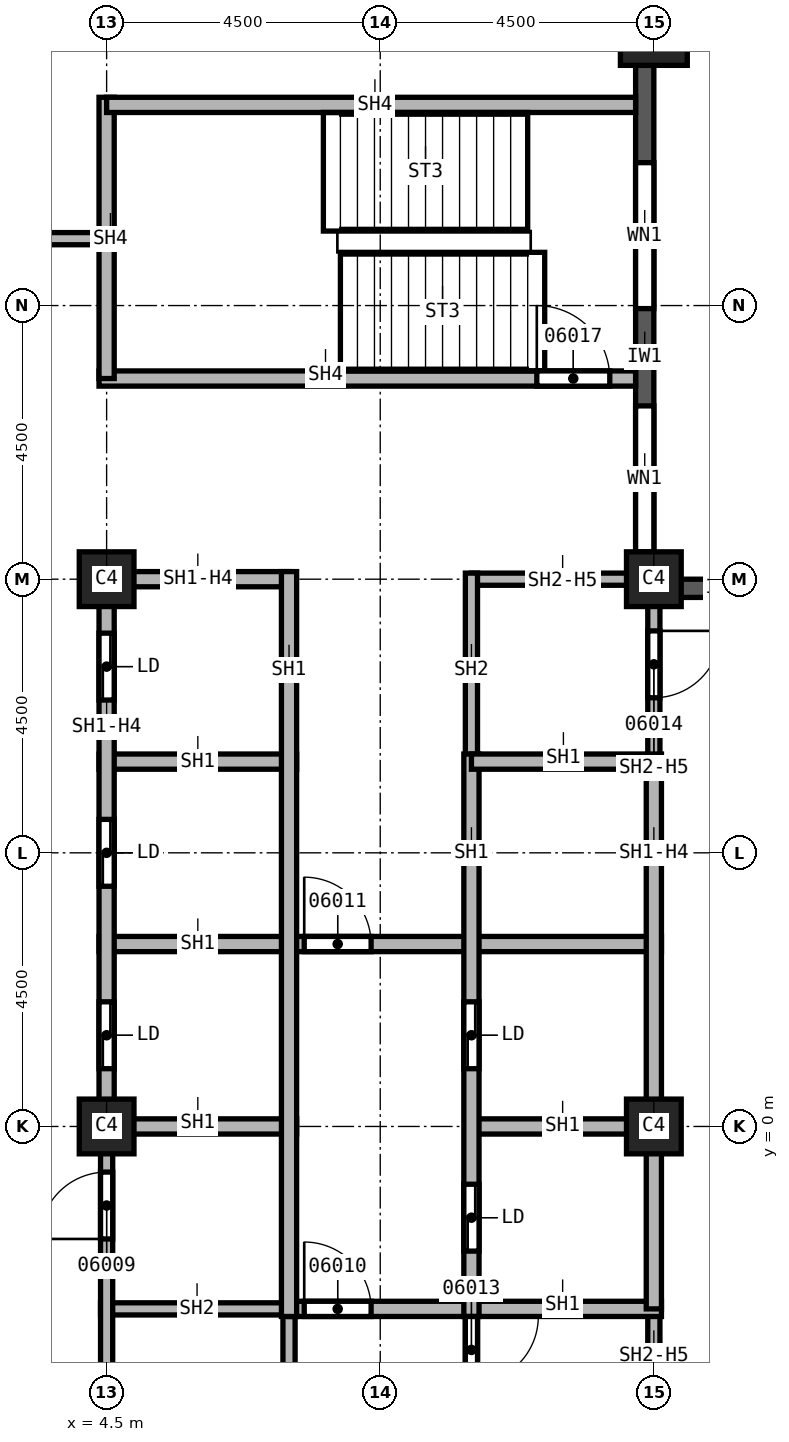
"""IFC4 building model, lengths in metres.
Left out: names, types, materials, properties, quantities, classifications, styles, units other than length and angle.
Written with IfcOpenShell. Run it as: python <this file> out.ifc"""

import sys

from ifc_helpers import new_model, si_unit, direction, frame, frame_2d, origin, origin_2d, place, context, subcontext, project, spatial, rectangle, extrude, element, fill, save


model = new_model("IFC4")
c1 = context("Model", 3, precision=1e-05, world=origin(), true_north=direction((0.0, 1.0)))
c2 = subcontext(c1, "Body", "Model", "MODEL_VIEW")
j1 = project(units=[si_unit("LENGTHUNIT", "METRE"), si_unit("PLANEANGLEUNIT", "RADIAN")], contexts=[c1])
p1 = place(None, origin())
s1 = spatial("IfcSite", under=j1, at=p1, CompositionType="ELEMENT")
p2 = place(p1, origin())
s2 = spatial("IfcBuilding", under=s1, at=p2, CompositionType="ELEMENT")
p3 = place(p2, frame((0.0, 0.0, 126.0)))
s3 = spatial("IfcBuildingStorey", under=s2, at=p3, CompositionType="ELEMENT", Elevation=126.0)
p4 = place(p3, frame((13.5, 18.0, 0.0), z_axis=(0.0, 0.0, 1.0), x_axis=(1.0, 0.0, 0.0)))
e1 = element("IfcColumn", 1, at=p4, inside=s3, PredefinedType="COLUMN", context=c2, shape_type="SweptSolid", body=[
    extrude(rectangle(XDim=1.1, YDim=1.1, at=origin_2d()), origin(), (0.0, 0.0, 1.0), 3.7),
])
for number, where, z_axis, x_axis in (
    (2, (4.5, 0.0, 0.0), (0.0, 0.0, 1.0), (1.0, 0.0, 0.0)),
    (3, (4.5, 9.0, 0.0), (0.0, 0.0, 1.0), (1.0, 0.0, 0.0)),
    (4, (13.5, 0.0, 0.0), (0.0, 0.0, 1.0), (1.0, 0.0, 0.0)),
    (5, (13.5, 9.0, 0.0), (0.0, 0.0, 1.0), (1.0, 0.0, 0.0)),
):
    element("IfcColumn", number, at=place(p3, frame(where, z_axis=z_axis, x_axis=x_axis)), inside=s3, PredefinedType="COLUMN", context=c2, shape_type="SweptSolid", body=[
        extrude(rectangle(XDim=0.9, YDim=0.9, at=origin_2d()), origin(), (0.0, 0.0, 1.0), 3.7),
    ])
p5 = place(p3, frame((13.35, 9.05, 0.0), z_axis=(0.0, 0.0, 1.0), x_axis=(0.0, 1.0, 0.0)))
e6 = element("IfcWall", 6, at=p5, inside=s3, PredefinedType="SOLIDWALL", context=c2, shape_type="SweptSolid", body=[
    extrude(rectangle(XDim=8.4, YDim=0.3, at=frame_2d((4.2, 0.0))), origin(), (0.0, 0.0, 1.0), 3.1),
])
p6 = place(p5, frame((0.4, 0.0, 0.8)))
e7 = element("IfcOpeningElement", 7, at=p6, cuts=e6, PredefinedType="OPENING", context=c2, shape_type="SweptSolid", body=[
    extrude(rectangle(XDim=2.4, YDim=1.95, at=frame_2d((1.2, 0.975))), frame((0.0, 0.15, 0.0), z_axis=(0.0, -1.0, 0.0), x_axis=(1.0, 0.0, 0.0)), (0.0, 0.0, 1.0), 0.3),
])
p7 = place(p5, frame((4.4, 0.0, 0.8)))
e8 = element("IfcOpeningElement", 8, at=p7, cuts=e6, PredefinedType="OPENING", context=c2, shape_type="SweptSolid", body=[
    extrude(rectangle(XDim=2.4, YDim=1.95, at=frame_2d((1.2, 0.975))), frame((0.0, 0.15, 0.0), z_axis=(0.0, -1.0, 0.0), x_axis=(1.0, 0.0, 0.0)), (0.0, 0.0, 1.0), 0.3),
])
p8 = place(p3, frame((21.95, 8.85, 0.0), z_axis=(0.0, 0.0, 1.0), x_axis=(-1.0, 0.0, 0.0)))
e9 = element("IfcWall", 9, at=p8, inside=s3, PredefinedType="SOLIDWALL", context=c2, shape_type="SweptSolid", body=[
    extrude(rectangle(XDim=8.4, YDim=0.3, at=frame_2d((4.2, 0.0))), origin(), (0.0, 0.0, 1.0), 3.1),
])
p9 = place(p8, frame((1.65, 0.0, 0.8)))
e10 = element("IfcOpeningElement", 10, at=p9, cuts=e9, PredefinedType="OPENING", context=c2, shape_type="SweptSolid", body=[
    extrude(rectangle(XDim=1.4, YDim=1.95, at=frame_2d((0.7, 0.975))), frame((0.0, 0.15, 0.0), z_axis=(0.0, -1.0, 0.0), x_axis=(1.0, 0.0, 0.0)), (0.0, 0.0, 1.0), 0.3),
])
p10 = place(p8, frame((4.875, 0.0, 0.8)))
e11 = element("IfcOpeningElement", 11, at=p10, cuts=e9, PredefinedType="OPENING", context=c2, shape_type="SweptSolid", body=[
    extrude(rectangle(XDim=1.4, YDim=1.95, at=frame_2d((0.7, 0.975))), frame((0.0, 0.15, 0.0), z_axis=(0.0, -1.0, 0.0), x_axis=(1.0, 0.0, 0.0)), (0.0, 0.0, 1.0), 0.3),
])
p11 = place(p3, frame((0.9, 14.6, 0.0), z_axis=(0.0, 0.0, 1.0), x_axis=(1.0, 0.0, 0.0)))
e12 = element("IfcWall", 12, at=p11, inside=s3, PredefinedType="PARTITIONING", context=c2, shape_type="SweptSolid", body=[
    extrude(rectangle(XDim=3.6, YDim=0.2, at=frame_2d((1.8, 0.0))), origin(), (0.0, 0.0, 1.0), 3.088),
])
p12 = place(p3, frame((4.4, -3.0, 0.0), z_axis=(0.0, 0.0, 1.0), x_axis=(1.0, 0.0, 0.0)))
e13 = element("IfcWall", 13, at=p12, inside=s3, PredefinedType="SOLIDWALL", context=c2, shape_type="SweptSolid", body=[
    extrude(rectangle(XDim=3.225, YDim=0.2, at=frame_2d((1.613, 0.0))), origin(), (0.0, 0.0, 1.0), 3.7),
])
p13 = place(p3, frame((4.5, -9.1, 0.0), z_axis=(0.0, 0.0, 1.0), x_axis=(0.0, 1.0, 0.0)))
e14 = element("IfcWall", 14, at=p13, inside=s3, PredefinedType="SOLIDWALL", context=c2, shape_type="SweptSolid", body=[
    extrude(rectangle(XDim=9.1, YDim=0.2, at=frame_2d((4.55, 0.0))), origin(), (0.0, 0.0, 1.0), 2.938),
])
p14 = place(p13, frame((0.85, 0.0, 0.0)))
e15 = element("IfcOpeningElement", 15, at=p14, cuts=e14, PredefinedType="OPENING", context=c2, shape_type="SweptSolid", body=[
    extrude(rectangle(XDim=1.1, YDim=2.1, at=frame_2d((0.55, 1.05))), frame((0.0, 0.1, 0.0), z_axis=(0.0, -1.0, 0.0), x_axis=(1.0, 0.0, 0.0)), (0.0, 0.0, 1.0), 0.2),
])
p15 = place(p13, frame((7.25, 0.0, 0.0)))
e16 = element("IfcOpeningElement", 16, at=p15, cuts=e14, PredefinedType="OPENING", context=c2, shape_type="SweptSolid", body=[
    extrude(rectangle(XDim=1.1, YDim=2.1, at=frame_2d((0.55, 1.05))), frame((0.0, 0.1, 0.0), z_axis=(0.0, -1.0, 0.0), x_axis=(1.0, 0.0, 0.0)), (0.0, 0.0, 1.0), 0.2),
])
p16 = place(p3, frame((7.5, -2.875, 0.0), z_axis=(0.0, 0.0, 1.0), x_axis=(0.0, -1.0, 0.0)))
e17 = element("IfcWall", 17, at=p16, inside=s3, PredefinedType="SOLIDWALL", context=c2, shape_type="SweptSolid", body=[
    extrude(rectangle(XDim=6.225, YDim=0.2, at=frame_2d((3.113, 0.0))), origin(), (0.0, 0.0, 1.0), 3.7),
])
p17 = place(p3, frame((10.5, -2.875, 0.0), z_axis=(0.0, 0.0, 1.0), x_axis=(0.0, -1.0, 0.0)))
e18 = element("IfcWall", 18, at=p17, inside=s3, PredefinedType="SOLIDWALL", context=c2, shape_type="SweptSolid", body=[
    extrude(rectangle(XDim=1.7, YDim=0.2, at=frame_2d((0.85, 0.0))), origin(), (0.0, 0.0, 1.0), 3.7),
])
p18 = place(p17, frame((0.25, 0.0, 0.0)))
e19 = element("IfcOpeningElement", 19, at=p18, cuts=e18, PredefinedType="OPENING", context=c2, shape_type="SweptSolid", body=[
    extrude(rectangle(XDim=1.1, YDim=2.1, at=frame_2d((0.55, 1.05))), frame((0.0, 0.1, 0.0), z_axis=(0.0, -1.0, 0.0), x_axis=(1.0, 0.0, 0.0)), (0.0, 0.0, 1.0), 0.2),
])
p19 = place(p3, frame((10.5, 9.0, 0.0), z_axis=(0.0, 0.0, 1.0), x_axis=(1.0, 0.0, 0.0)))
e20 = element("IfcWall", 20, at=p19, inside=s3, PredefinedType="SOLIDWALL", context=c2, shape_type="SweptSolid", body=[
    extrude(rectangle(XDim=3.0, YDim=0.2, at=frame_2d((1.5, 0.0))), origin(), (0.0, 0.0, 1.0), 2.938),
])
p20 = place(p3, frame((10.5, 9.1, 0.0), z_axis=(0.0, 0.0, 1.0), x_axis=(0.0, -1.0, 0.0)))
e21 = element("IfcWall", 21, at=p20, inside=s3, PredefinedType="SOLIDWALL", context=c2, shape_type="SweptSolid", body=[
    extrude(rectangle(XDim=3.225, YDim=0.2, at=frame_2d((1.613, 0.0))), origin(), (0.0, 0.0, 1.0), 3.7),
])
p21 = place(p3, frame((13.5, -3.0, 0.0), z_axis=(0.0, 0.0, 1.0), x_axis=(0.0, -1.0, 0.0)))
e22 = element("IfcWall", 22, at=p21, inside=s3, PredefinedType="SOLIDWALL", context=c2, shape_type="SweptSolid", body=[
    extrude(rectangle(XDim=1.5, YDim=0.2, at=frame_2d((0.75, 0.0))), origin(), (0.0, 0.0, 1.0), 2.938),
])
p22 = place(p3, frame((13.5, 9.05, 0.0), z_axis=(0.0, 0.0, 1.0), x_axis=(0.0, -1.0, 0.0)))
e23 = element("IfcWall", 23, at=p22, inside=s3, PredefinedType="SOLIDWALL", context=c2, shape_type="SweptSolid", body=[
    extrude(rectangle(XDim=3.05, YDim=0.2, at=frame_2d((1.525, 0.0))), origin(), (0.0, 0.0, 1.0), 2.938),
])
p23 = place(p22, frame((0.9, 0.0, 0.0)))
e24 = element("IfcOpeningElement", 24, at=p23, cuts=e23, PredefinedType="OPENING", context=c2, shape_type="SweptSolid", body=[
    extrude(rectangle(XDim=1.1, YDim=2.1, at=frame_2d((0.55, 1.05))), frame((0.0, 0.1, 0.0), z_axis=(0.0, -1.0, 0.0), x_axis=(1.0, 0.0, 0.0)), (0.0, 0.0, 1.0), 0.2),
])
p24 = place(p3, frame((4.375, 0.0, 0.0), z_axis=(0.0, 0.0, 1.0), x_axis=(1.0, 0.0, 0.0)))
e25 = element("IfcWall", 25, at=p24, inside=s3, PredefinedType="SOLIDWALL", context=c2, shape_type="SweptSolid", body=[
    extrude(rectangle(XDim=3.25, YDim=0.25, at=frame_2d((1.625, 0.0))), origin(), (0.0, 0.0, 1.0), 3.7),
])
p25 = place(p3, frame((4.375, 3.0, 0.0), z_axis=(0.0, 0.0, 1.0), x_axis=(1.0, 0.0, 0.0)))
e26 = element("IfcWall", 26, at=p25, inside=s3, PredefinedType="SOLIDWALL", context=c2, shape_type="SweptSolid", body=[
    extrude(rectangle(XDim=9.25, YDim=0.25, at=frame_2d((4.625, 0.0))), origin(), (0.0, 0.0, 1.0), 3.7),
])
p26 = place(p25, frame((3.375, 0.0, 0.0)))
e27 = element("IfcOpeningElement", 27, at=p26, cuts=e26, PredefinedType="OPENING", context=c2, shape_type="SweptSolid", body=[
    extrude(rectangle(XDim=1.1, YDim=2.1, at=frame_2d((0.55, 1.05))), frame((0.0, 0.125, 0.0), z_axis=(0.0, -1.0, 0.0), x_axis=(1.0, 0.0, 0.0)), (0.0, 0.0, 1.0), 0.25),
])
p27 = place(p3, frame((4.375, 6.0, 0.0), z_axis=(0.0, 0.0, 1.0), x_axis=(1.0, 0.0, 0.0)))
e28 = element("IfcWall", 28, at=p27, inside=s3, PredefinedType="SOLIDWALL", context=c2, shape_type="SweptSolid", body=[
    extrude(rectangle(XDim=3.25, YDim=0.25, at=frame_2d((1.625, 0.0))), origin(), (0.0, 0.0, 1.0), 3.7),
])
p28 = place(p3, frame((4.5, 0.0, 0.0), z_axis=(0.0, 0.0, 1.0), x_axis=(0.0, 1.0, 0.0)))
e29 = element("IfcWall", 29, at=p28, inside=s3, PredefinedType="SOLIDWALL", context=c2, shape_type="SweptSolid", body=[
    extrude(rectangle(XDim=9.125, YDim=0.25, at=frame_2d((4.562, 0.0))), origin(), (0.0, 0.0, 1.0), 2.938),
])
p29 = place(p28, frame((0.95, 0.0, 0.0)))
e30 = element("IfcOpeningElement", 30, at=p29, cuts=e29, PredefinedType="OPENING", context=c2, shape_type="SweptSolid", body=[
    extrude(rectangle(XDim=1.1, YDim=2.1, at=frame_2d((0.55, 1.05))), frame((0.0, 0.125, 0.0), z_axis=(0.0, -1.0, 0.0), x_axis=(1.0, 0.0, 0.0)), (0.0, 0.0, 1.0), 0.25),
])
p30 = place(p28, frame((3.95, 0.0, 0.0)))
e31 = element("IfcOpeningElement", 31, at=p30, cuts=e29, PredefinedType="OPENING", context=c2, shape_type="SweptSolid", body=[
    extrude(rectangle(XDim=1.1, YDim=2.1, at=frame_2d((0.55, 1.05))), frame((0.0, 0.125, 0.0), z_axis=(0.0, -1.0, 0.0), x_axis=(1.0, 0.0, 0.0)), (0.0, 0.0, 1.0), 0.25),
])
p31 = place(p28, frame((7.012, 0.0, 0.0)))
e32 = element("IfcOpeningElement", 32, at=p31, cuts=e29, PredefinedType="OPENING", context=c2, shape_type="SweptSolid", body=[
    extrude(rectangle(XDim=1.1, YDim=2.1, at=frame_2d((0.55, 1.05))), frame((0.0, 0.125, 0.0), z_axis=(0.0, -1.0, 0.0), x_axis=(1.0, 0.0, 0.0)), (0.0, 0.0, 1.0), 0.25),
])
p32 = place(p3, frame((4.5, 9.0, 0.0), z_axis=(0.0, 0.0, 1.0), x_axis=(1.0, 0.0, 0.0)))
e33 = element("IfcWall", 33, at=p32, inside=s3, PredefinedType="SOLIDWALL", context=c2, shape_type="SweptSolid", body=[
    extrude(rectangle(XDim=3.0, YDim=0.25, at=frame_2d((1.5, 0.0))), origin(), (0.0, 0.0, 1.0), 2.938),
])
p33 = place(p3, frame((7.5, -3.0, 0.0), z_axis=(0.0, 0.0, 1.0), x_axis=(1.0, 0.0, 0.0)))
e34 = element("IfcWall", 34, at=p33, inside=s3, PredefinedType="SOLIDWALL", context=c2, shape_type="SweptSolid", body=[
    extrude(rectangle(XDim=6.125, YDim=0.25, at=frame_2d((3.062, 0.0))), origin(), (0.0, 0.0, 1.0), 3.7),
])
p34 = place(p33, frame((0.25, 0.0, 0.0)))
e35 = element("IfcOpeningElement", 35, at=p34, cuts=e34, PredefinedType="OPENING", context=c2, shape_type="SweptSolid", body=[
    extrude(rectangle(XDim=1.1, YDim=2.1, at=frame_2d((0.55, 1.05))), frame((0.0, 0.125, 0.0), z_axis=(0.0, -1.0, 0.0), x_axis=(1.0, 0.0, 0.0)), (0.0, 0.0, 1.0), 0.25),
])
p35 = place(p3, frame((7.5, 9.125, 0.0), z_axis=(0.0, 0.0, 1.0), x_axis=(0.0, -1.0, 0.0)))
e36 = element("IfcWall", 36, at=p35, inside=s3, PredefinedType="SOLIDWALL", context=c2, shape_type="SweptSolid", body=[
    extrude(rectangle(XDim=12.25, YDim=0.25, at=frame_2d((6.125, 0.0))), origin(), (0.0, 0.0, 1.0), 3.7),
])
p36 = place(p3, frame((10.5, 0.0, 0.0), z_axis=(0.0, 0.0, 1.0), x_axis=(1.0, 0.0, 0.0)))
e37 = element("IfcWall", 37, at=p36, inside=s3, PredefinedType="SOLIDWALL", context=c2, shape_type="SweptSolid", body=[
    extrude(rectangle(XDim=3.125, YDim=0.25, at=frame_2d((1.562, 0.0))), origin(), (0.0, 0.0, 1.0), 3.7),
])
p37 = place(p3, frame((10.5, 6.125, 0.0), z_axis=(0.0, 0.0, 1.0), x_axis=(0.0, -1.0, 0.0)))
e38 = element("IfcWall", 38, at=p37, inside=s3, PredefinedType="SOLIDWALL", context=c2, shape_type="SweptSolid", body=[
    extrude(rectangle(XDim=9.25, YDim=0.25, at=frame_2d((4.625, 0.0))), origin(), (0.0, 0.0, 1.0), 3.7),
])
p38 = place(p37, frame((7.075, 0.0, 0.0)))
e39 = element("IfcOpeningElement", 39, at=p38, cuts=e38, PredefinedType="OPENING", context=c2, shape_type="SweptSolid", body=[
    extrude(rectangle(XDim=1.1, YDim=2.1, at=frame_2d((0.55, 1.05))), frame((0.0, 0.125, 0.0), z_axis=(0.0, -1.0, 0.0), x_axis=(1.0, 0.0, 0.0)), (0.0, 0.0, 1.0), 0.25),
])
p39 = place(p37, frame((4.075, 0.0, 0.0)))
e40 = element("IfcOpeningElement", 40, at=p39, cuts=e38, PredefinedType="OPENING", context=c2, shape_type="SweptSolid", body=[
    extrude(rectangle(XDim=1.1, YDim=2.1, at=frame_2d((0.55, 1.05))), frame((0.0, 0.125, 0.0), z_axis=(0.0, -1.0, 0.0), x_axis=(1.0, 0.0, 0.0)), (0.0, 0.0, 1.0), 0.25),
])
p40 = place(p3, frame((10.5, 6.0, 0.0), z_axis=(0.0, 0.0, 1.0), x_axis=(1.0, 0.0, 0.0)))
e41 = element("IfcWall", 41, at=p40, inside=s3, PredefinedType="SOLIDWALL", context=c2, shape_type="SweptSolid", body=[
    extrude(rectangle(XDim=3.125, YDim=0.25, at=frame_2d((1.562, 0.0))), origin(), (0.0, 0.0, 1.0), 3.7),
])
p41 = place(p3, frame((13.5, 6.0, 0.0), z_axis=(0.0, 0.0, 1.0), x_axis=(0.0, -1.0, 0.0)))
e42 = element("IfcWall", 42, at=p41, inside=s3, PredefinedType="SOLIDWALL", context=c2, shape_type="SweptSolid", body=[
    extrude(rectangle(XDim=9.0, YDim=0.25, at=frame_2d((4.5, 0.0))), origin(), (0.0, 0.0, 1.0), 2.938),
])
p42 = place(p3, frame((4.375, 12.3, 0.0), z_axis=(0.0, 0.0, 1.0), x_axis=(1.0, 0.0, 0.0)))
e43 = element("IfcWall", 43, at=p42, inside=s3, PredefinedType="SOLIDWALL", context=c2, shape_type="SweptSolid", body=[
    extrude(rectangle(XDim=8.825, YDim=0.25, at=frame_2d((4.413, 0.0))), origin(), (0.0, 0.0, 1.0), 3.7),
])
p43 = place(p42, frame((7.2, 0.0, 0.0)))
e44 = element("IfcOpeningElement", 44, at=p43, cuts=e43, PredefinedType="OPENING", context=c2, shape_type="SweptSolid", body=[
    extrude(rectangle(XDim=1.2, YDim=2.1, at=frame_2d((0.6, 1.05))), frame((0.0, 0.125, 0.0), z_axis=(0.0, -1.0, 0.0), x_axis=(1.0, 0.0, 0.0)), (0.0, 0.0, 1.0), 0.25),
])
p44 = place(p3, frame((4.5, 12.3, 0.0), z_axis=(0.0, 0.0, 1.0), x_axis=(0.0, 1.0, 0.0)))
e45 = element("IfcWall", 45, at=p44, inside=s3, PredefinedType="SOLIDWALL", context=c2, shape_type="SweptSolid", body=[
    extrude(rectangle(XDim=4.625, YDim=0.25, at=frame_2d((2.312, 0.0))), origin(), (0.0, 0.0, 1.0), 3.7),
])
p45 = place(p3, frame((4.5, 16.8, 0.0), z_axis=(0.0, 0.0, 1.0), x_axis=(1.0, 0.0, 0.0)))
e46 = element("IfcWall", 46, at=p45, inside=s3, PredefinedType="SOLIDWALL", context=c2, shape_type="SweptSolid", body=[
    extrude(rectangle(XDim=8.7, YDim=0.25, at=frame_2d((4.35, 0.0))), origin(), (0.0, 0.0, 1.0), 3.7),
])
p46 = place(p6, origin())
e47 = element("IfcWindow", 47, at=p46, inside=s3, PartitioningType="SINGLE_PANEL", PredefinedType="WINDOW", context=c2, shape_type="SweptSolid", body=[
    extrude(rectangle(XDim=2.4, YDim=1.95, at=frame_2d((1.2, 0.975))), frame((0.0, 0.03, 0.0), z_axis=(0.0, -1.0, 0.0), x_axis=(1.0, 0.0, 0.0)), (0.0, 0.0, 1.0), 0.06),
])
fill(e7, e47)
p47 = place(p7, origin())
e48 = element("IfcWindow", 48, at=p47, inside=s3, PartitioningType="SINGLE_PANEL", PredefinedType="WINDOW", context=c2, shape_type="SweptSolid", body=[
    extrude(rectangle(XDim=2.4, YDim=1.95, at=frame_2d((1.2, 0.975))), frame((0.0, 0.03, 0.0), z_axis=(0.0, -1.0, 0.0), x_axis=(1.0, 0.0, 0.0)), (0.0, 0.0, 1.0), 0.06),
])
fill(e8, e48)
p48 = place(p15, origin())
e49 = element("IfcDoor", 49, at=p48, inside=s3, OperationType="SINGLE_SWING_RIGHT", PredefinedType="DOOR", context=c2, shape_type="SweptSolid", body=[
    extrude(rectangle(XDim=1.1, YDim=2.1, at=frame_2d((0.55, 1.05))), frame((0.0, 0.025, 0.0), z_axis=(0.0, -1.0, 0.0), x_axis=(1.0, 0.0, 0.0)), (0.0, 0.0, 1.0), 0.05),
])
fill(e16, e49)
p49 = place(p34, origin())
e50 = element("IfcDoor", 50, at=p49, inside=s3, OperationType="SINGLE_SWING_LEFT", PredefinedType="DOOR", context=c2, shape_type="SweptSolid", body=[
    extrude(rectangle(XDim=1.1, YDim=2.1, at=frame_2d((0.55, 1.05))), frame((0.0, 0.025, 0.0), z_axis=(0.0, -1.0, 0.0), x_axis=(1.0, 0.0, 0.0)), (0.0, 0.0, 1.0), 0.05),
])
fill(e35, e50)
p50 = place(p26, origin())
e51 = element("IfcDoor", 51, at=p50, inside=s3, OperationType="SINGLE_SWING_RIGHT", PredefinedType="DOOR", context=c2, shape_type="SweptSolid", body=[
    extrude(rectangle(XDim=1.1, YDim=2.1, at=frame_2d((0.55, 1.05))), frame((0.0, 0.025, 0.0), z_axis=(0.0, -1.0, 0.0), x_axis=(1.0, 0.0, 0.0)), (0.0, 0.0, 1.0), 0.05),
])
fill(e27, e51)
p51 = place(p18, origin())
e52 = element("IfcDoor", 52, at=p51, inside=s3, OperationType="SINGLE_SWING_RIGHT", PredefinedType="DOOR", context=c2, shape_type="SweptSolid", body=[
    extrude(rectangle(XDim=1.1, YDim=2.1, at=frame_2d((0.55, 1.05))), frame((0.0, 0.025, 0.0), z_axis=(0.0, -1.0, 0.0), x_axis=(1.0, 0.0, 0.0)), (0.0, 0.0, 1.0), 0.05),
])
fill(e19, e52)
p52 = place(p23, origin())
e53 = element("IfcDoor", 53, at=p52, inside=s3, OperationType="SINGLE_SWING_LEFT", PredefinedType="DOOR", context=c2, shape_type="SweptSolid", body=[
    extrude(rectangle(XDim=1.1, YDim=2.1, at=frame_2d((0.55, 1.05))), frame((0.0, 0.025, 0.0), z_axis=(0.0, -1.0, 0.0), x_axis=(1.0, 0.0, 0.0)), (0.0, 0.0, 1.0), 0.05),
])
fill(e24, e53)
p53 = place(p43, origin())
e54 = element("IfcDoor", 54, at=p53, inside=s3, OperationType="SINGLE_SWING_RIGHT", PredefinedType="DOOR", context=c2, shape_type="SweptSolid", body=[
    extrude(rectangle(XDim=1.2, YDim=2.1, at=frame_2d((0.6, 1.05))), frame((0.0, 0.025, 0.0), z_axis=(0.0, -1.0, 0.0), x_axis=(1.0, 0.0, 0.0)), (0.0, 0.0, 1.0), 0.05),
])
fill(e44, e54)
p54 = place(p29, origin())
e55 = element("IfcDoor", 55, at=p54, inside=s3, OperationType="SLIDING_TO_LEFT", PredefinedType="DOOR", context=c2, shape_type="SweptSolid", body=[
    extrude(rectangle(XDim=1.1, YDim=2.1, at=frame_2d((0.55, 1.05))), frame((0.0, 0.025, 0.0), z_axis=(0.0, -1.0, 0.0), x_axis=(1.0, 0.0, 0.0)), (0.0, 0.0, 1.0), 0.05),
])
fill(e30, e55)
p55 = place(p30, origin())
e56 = element("IfcDoor", 56, at=p55, inside=s3, OperationType="SLIDING_TO_LEFT", PredefinedType="DOOR", context=c2, shape_type="SweptSolid", body=[
    extrude(rectangle(XDim=1.1, YDim=2.1, at=frame_2d((0.55, 1.05))), frame((0.0, 0.025, 0.0), z_axis=(0.0, -1.0, 0.0), x_axis=(1.0, 0.0, 0.0)), (0.0, 0.0, 1.0), 0.05),
])
fill(e31, e56)
p56 = place(p31, origin())
e57 = element("IfcDoor", 57, at=p56, inside=s3, OperationType="SLIDING_TO_LEFT", PredefinedType="DOOR", context=c2, shape_type="SweptSolid", body=[
    extrude(rectangle(XDim=1.1, YDim=2.1, at=frame_2d((0.55, 1.05))), frame((0.0, 0.025, 0.0), z_axis=(0.0, -1.0, 0.0), x_axis=(1.0, 0.0, 0.0)), (0.0, 0.0, 1.0), 0.05),
])
fill(e32, e57)
p57 = place(p38, origin())
e58 = element("IfcDoor", 58, at=p57, inside=s3, OperationType="SLIDING_TO_LEFT", PredefinedType="DOOR", context=c2, shape_type="SweptSolid", body=[
    extrude(rectangle(XDim=1.1, YDim=2.1, at=frame_2d((0.55, 1.05))), frame((0.0, 0.025, 0.0), z_axis=(0.0, -1.0, 0.0), x_axis=(1.0, 0.0, 0.0)), (0.0, 0.0, 1.0), 0.05),
])
fill(e39, e58)
p58 = place(p39, origin())
e59 = element("IfcDoor", 59, at=p58, inside=s3, OperationType="SLIDING_TO_LEFT", PredefinedType="DOOR", context=c2, shape_type="SweptSolid", body=[
    extrude(rectangle(XDim=1.1, YDim=2.1, at=frame_2d((0.55, 1.05))), frame((0.0, 0.025, 0.0), z_axis=(0.0, -1.0, 0.0), x_axis=(1.0, 0.0, 0.0)), (0.0, 0.0, 1.0), 0.05),
])
fill(e40, e59)
save(model, sys.argv[1])
